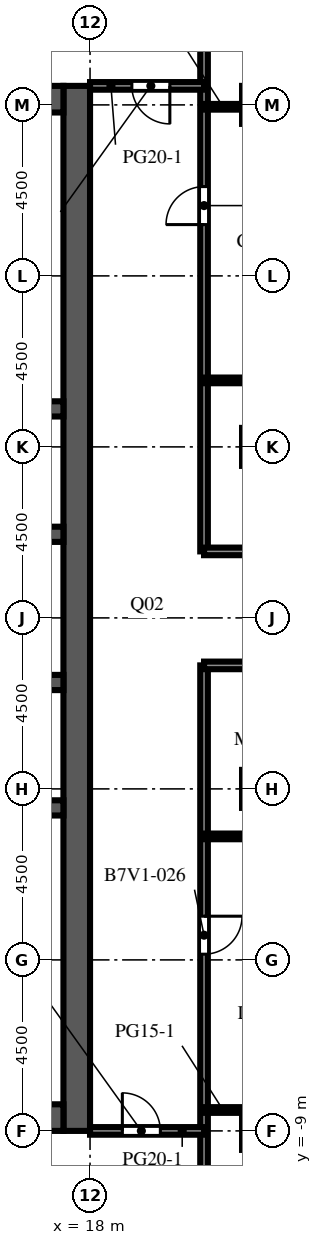
"""IFC4 building model, lengths in metres.
Left out: names, types, materials, properties, quantities, classifications, styles, units other than length and angle.
Written with IfcOpenShell. Run it as: python <this file> out.ifc"""

import sys

from ifc_helpers import new_model, si_unit, direction, frame, frame_2d, origin, place, context, subcontext, project, spatial, rectangle, extrude, element, fill, save


model = new_model("IFC4")
c1 = context("Model", 3, precision=1e-05, world=origin(), true_north=direction((0.0, 1.0)))
c2 = subcontext(c1, "Body", "Model", "MODEL_VIEW")
j1 = project(units=[si_unit("LENGTHUNIT", "METRE"), si_unit("PLANEANGLEUNIT", "RADIAN")], contexts=[c1])
p1 = place(None, origin())
s1 = spatial("IfcSite", under=j1, at=p1, CompositionType="ELEMENT")
p2 = place(p1, origin())
s2 = spatial("IfcBuilding", under=s1, at=p2, CompositionType="ELEMENT")
p3 = place(p2, frame((0.0, 0.0, 252.1)))
s3 = spatial("IfcBuildingStorey", under=s2, at=p3, CompositionType="ELEMENT", Elevation=252.1)
p4 = place(p3, frame((17.65, -9.0, 0.0), z_axis=(0.0, 0.0, 1.0), x_axis=(0.0, 1.0, 0.0)))
e1 = element("IfcWall", 1, at=p4, inside=s3, PredefinedType="SHEAR", context=c2, shape_type="SweptSolid", body=[
    extrude(rectangle(XDim=27.5, YDim=0.7, at=frame_2d((13.75, 0.0))), origin(), (0.0, 0.0, 1.0), 4.1),
])
p5 = place(p4, frame((12.55, 0.0, 0.0)))
e2 = element("IfcOpeningElement", 2, at=p5, cuts=e1, PredefinedType="OPENING", context=c2, shape_type="SweptSolid", body=[
    extrude(rectangle(XDim=2.4, YDim=2.4, at=frame_2d((1.2, 1.2))), frame((0.0, 0.36, 0.0), z_axis=(0.0, -1.0, 0.0), x_axis=(1.0, 0.0, 0.0)), (0.0, 0.0, 1.0), 0.72),
])
p6 = place(p4, frame((6.825, 0.0, 0.0)))
e3 = element("IfcOpeningElement", 3, at=p6, cuts=e1, PredefinedType="OPENING", context=c2, shape_type="SweptSolid", body=[
    extrude(rectangle(XDim=1.2, YDim=2.1, at=frame_2d((0.6, 1.05))), frame((0.0, 0.36, 0.0), z_axis=(0.0, -1.0, 0.0), x_axis=(1.0, 0.0, 0.0)), (0.0, 0.0, 1.0), 0.72),
])
p7 = place(p4, frame((19.475, 0.0, 0.0)))
e4 = element("IfcOpeningElement", 4, at=p7, cuts=e1, PredefinedType="OPENING", context=c2, shape_type="SweptSolid", body=[
    extrude(rectangle(XDim=1.2, YDim=2.1, at=frame_2d((0.6, 1.05))), frame((0.0, 0.36, 0.0), z_axis=(0.0, -1.0, 0.0), x_axis=(1.0, 0.0, 0.0)), (0.0, 0.0, 1.0), 0.72),
])
for number, where, z_axis, x_axis in (
    (5, (6.7, -8.65, 0.0), (0.0, 0.0, 1.0), (1.0, 0.0, 0.0)),
    (6, (6.7, 18.15, 0.0), (0.0, 0.0, 1.0), (1.0, 0.0, 0.0)),
):
    element("IfcWall", number, at=place(p3, frame(where, z_axis=z_axis, x_axis=x_axis)), inside=s3, PredefinedType="SHEAR", context=c2, shape_type="SweptSolid", body=[
        extrude(rectangle(XDim=10.6, YDim=0.7, at=frame_2d((5.3, 0.0))), origin(), (0.0, 0.0, 1.0), 4.1),
    ])
p8 = place(p3, frame((6.7, -0.5, 0.0), z_axis=(0.0, 0.0, 1.0), x_axis=(1.0, 0.0, 0.0)))
e7 = element("IfcWall", 7, at=p8, inside=s3, PredefinedType="SHEAR", context=c2, shape_type="SweptSolid", body=[
    extrude(rectangle(XDim=10.6, YDim=0.4, at=frame_2d((5.3, 0.0))), origin(), (0.0, 0.0, 1.0), 4.1),
])
p9 = place(p3, frame((6.7, 2.8, 0.0), z_axis=(0.0, 0.0, 1.0), x_axis=(1.0, 0.0, 0.0)))
e8 = element("IfcWall", 8, at=p9, inside=s3, PredefinedType="SHEAR", context=c2, shape_type="SweptSolid", body=[
    extrude(rectangle(XDim=10.6, YDim=0.4, at=frame_2d((5.3, 0.0))), origin(), (0.0, 0.0, 1.0), 4.1),
])
p10 = place(p9, frame((0.688, 0.0, 0.0)))
e9 = element("IfcOpeningElement", 9, at=p10, cuts=e8, PredefinedType="OPENING", context=c2, shape_type="SweptSolid", body=[
    extrude(rectangle(XDim=1.1, YDim=2.1, at=frame_2d((0.55, 1.05))), frame((0.0, 0.21, 0.0), z_axis=(0.0, -1.0, 0.0), x_axis=(1.0, 0.0, 0.0)), (0.0, 0.0, 1.0), 0.42),
])
p11 = place(p9, frame((3.438, 0.0, 0.0)))
e10 = element("IfcOpeningElement", 10, at=p11, cuts=e8, PredefinedType="OPENING", context=c2, shape_type="SweptSolid", body=[
    extrude(rectangle(XDim=1.1, YDim=2.1, at=frame_2d((0.55, 1.05))), frame((0.0, 0.21, 0.0), z_axis=(0.0, -1.0, 0.0), x_axis=(1.0, 0.0, 0.0)), (0.0, 0.0, 1.0), 0.42),
])
p12 = place(p9, frame((6.113, 0.0, 0.0)))
e11 = element("IfcOpeningElement", 11, at=p12, cuts=e8, PredefinedType="OPENING", context=c2, shape_type="SweptSolid", body=[
    extrude(rectangle(XDim=1.0, YDim=2.1, at=frame_2d((0.5, 1.05))), frame((0.0, 0.21, 0.0), z_axis=(0.0, -1.0, 0.0), x_axis=(1.0, 0.0, 0.0)), (0.0, 0.0, 1.0), 0.42),
])
p13 = place(p9, frame((8.863, 0.0, 0.0)))
e12 = element("IfcOpeningElement", 12, at=p13, cuts=e8, PredefinedType="OPENING", context=c2, shape_type="SweptSolid", body=[
    extrude(rectangle(XDim=1.0, YDim=2.1, at=frame_2d((0.5, 1.05))), frame((0.0, 0.21, 0.0), z_axis=(0.0, -1.0, 0.0), x_axis=(1.0, 0.0, 0.0)), (0.0, 0.0, 1.0), 0.42),
])
p14 = place(p3, frame((6.7, 6.7, 0.0), z_axis=(0.0, 0.0, 1.0), x_axis=(1.0, 0.0, 0.0)))
e13 = element("IfcWall", 13, at=p14, inside=s3, PredefinedType="SHEAR", context=c2, shape_type="SweptSolid", body=[
    extrude(rectangle(XDim=10.6, YDim=0.4, at=frame_2d((5.3, 0.0))), origin(), (0.0, 0.0, 1.0), 4.1),
])
p15 = place(p14, frame((3.438, 0.0, 0.0)))
e14 = element("IfcOpeningElement", 14, at=p15, cuts=e13, PredefinedType="OPENING", context=c2, shape_type="SweptSolid", body=[
    extrude(rectangle(XDim=1.1, YDim=2.1, at=frame_2d((0.55, 1.05))), frame((0.0, 0.21, 0.0), z_axis=(0.0, -1.0, 0.0), x_axis=(1.0, 0.0, 0.0)), (0.0, 0.0, 1.0), 0.42),
])
p16 = place(p14, frame((6.062, 0.0, 0.0)))
e15 = element("IfcOpeningElement", 15, at=p16, cuts=e13, PredefinedType="OPENING", context=c2, shape_type="SweptSolid", body=[
    extrude(rectangle(XDim=1.1, YDim=2.1, at=frame_2d((0.55, 1.05))), frame((0.0, 0.21, 0.0), z_axis=(0.0, -1.0, 0.0), x_axis=(1.0, 0.0, 0.0)), (0.0, 0.0, 1.0), 0.42),
])
p17 = place(p14, frame((8.812, 0.0, 0.0)))
e16 = element("IfcOpeningElement", 16, at=p17, cuts=e13, PredefinedType="OPENING", context=c2, shape_type="SweptSolid", body=[
    extrude(rectangle(XDim=1.1, YDim=2.1, at=frame_2d((0.55, 1.05))), frame((0.0, 0.21, 0.0), z_axis=(0.0, -1.0, 0.0), x_axis=(1.0, 0.0, 0.0)), (0.0, 0.0, 1.0), 0.42),
])
p18 = place(p14, frame((0.738, 0.0, 0.0)))
e17 = element("IfcOpeningElement", 17, at=p18, cuts=e13, PredefinedType="OPENING", context=c2, shape_type="SweptSolid", body=[
    extrude(rectangle(XDim=1.0, YDim=2.1, at=frame_2d((0.5, 1.05))), frame((0.0, 0.21, 0.0), z_axis=(0.0, -1.0, 0.0), x_axis=(1.0, 0.0, 0.0)), (0.0, 0.0, 1.0), 0.42),
])
p19 = place(p3, frame((6.7, 10.0, 0.0), z_axis=(0.0, 0.0, 1.0), x_axis=(1.0, 0.0, 0.0)))
e18 = element("IfcWall", 18, at=p19, inside=s3, PredefinedType="SHEAR", context=c2, shape_type="SweptSolid", body=[
    extrude(rectangle(XDim=10.6, YDim=0.4, at=frame_2d((5.3, 0.0))), origin(), (0.0, 0.0, 1.0), 4.1),
])
p20 = place(p3, frame((21.0, 3.25, 0.0), z_axis=(0.0, 0.0, 1.0), x_axis=(0.0, -1.0, 0.0)))
e19 = element("IfcWall", 19, at=p20, inside=s3, PredefinedType="PARTITIONING", context=c2, shape_type="SweptSolid", body=[
    extrude(rectangle(XDim=25.6, YDim=0.2, at=frame_2d((12.8, 0.0))), origin(), (0.0, 0.0, 1.0), 3.65),
])
p21 = place(p20, frame((6.6, 0.0, 0.0)))
e20 = element("IfcOpeningElement", 20, at=p21, cuts=e19, PredefinedType="OPENING", context=c2, shape_type="SweptSolid", body=[
    extrude(rectangle(XDim=1.0, YDim=2.1, at=frame_2d((0.5, 1.05))), frame((0.0, 0.11, 0.0), z_axis=(0.0, -1.0, 0.0), x_axis=(1.0, 0.0, 0.0)), (0.0, 0.0, 1.0), 0.22),
])
p22 = place(p3, frame((21.0, 31.35, 0.0), z_axis=(0.0, 0.0, 1.0), x_axis=(0.0, -1.0, 0.0)))
e21 = element("IfcWall", 21, at=p22, inside=s3, PredefinedType="PARTITIONING", context=c2, shape_type="SweptSolid", body=[
    extrude(rectangle(XDim=25.1, YDim=0.2, at=frame_2d((12.55, 0.0))), origin(), (0.0, 0.0, 1.0), 3.65),
])
p23 = place(p22, frame((15.5, 0.0, 0.0)))
e22 = element("IfcOpeningElement", 22, at=p23, cuts=e21, PredefinedType="OPENING", context=c2, shape_type="SweptSolid", body=[
    extrude(rectangle(XDim=1.0, YDim=2.1, at=frame_2d((0.5, 1.05))), frame((0.0, 0.11, 0.0), z_axis=(0.0, -1.0, 0.0), x_axis=(1.0, 0.0, 0.0)), (0.0, 0.0, 1.0), 0.22),
])
p24 = place(p3, frame((21.0, -9.0, 0.0), z_axis=(0.0, 0.0, 1.0), x_axis=(-1.0, 0.0, 0.0)))
e23 = element("IfcWall", 23, at=p24, inside=s3, PredefinedType="PARTITIONING", context=c2, shape_type="SweptSolid", body=[
    extrude(rectangle(XDim=3.0, YDim=0.2, at=frame_2d((1.5, 0.0))), origin(), (0.0, 0.0, 1.0), 3.65),
])
p25 = place(p24, frame((1.15, 0.0, 0.0)))
e24 = element("IfcOpeningElement", 24, at=p25, cuts=e23, PredefinedType="OPENING", context=c2, shape_type="SweptSolid", body=[
    extrude(rectangle(XDim=1.0, YDim=2.1, at=frame_2d((0.5, 1.05))), frame((0.0, 0.11, 0.0), z_axis=(0.0, -1.0, 0.0), x_axis=(1.0, 0.0, 0.0)), (0.0, 0.0, 1.0), 0.22),
])
p26 = place(p3, frame((21.0, -8.45, 0.0), z_axis=(0.0, 0.0, 1.0), x_axis=(1.0, 0.0, 0.0)))
e25 = element("IfcWall", 25, at=p26, inside=s3, PredefinedType="PARTITIONING", context=c2, shape_type="SweptSolid", body=[
    extrude(rectangle(XDim=1.0, YDim=0.15, at=frame_2d((0.5, 0.0))), origin(), (0.0, 0.0, 1.0), 3.65),
])
p27 = place(p3, frame((21.0, -1.25, 0.0), z_axis=(0.0, 0.0, 1.0), x_axis=(1.0, 0.0, 0.0)))
e26 = element("IfcWall", 26, at=p27, inside=s3, PredefinedType="PARTITIONING", context=c2, shape_type="SweptSolid", body=[
    extrude(rectangle(XDim=5.85, YDim=0.15, at=frame_2d((2.925, 0.0))), origin(), (0.0, 0.0, 1.0), 3.65),
])
p28 = place(p27, frame((3.1, 0.0, 0.0)))
e27 = element("IfcOpeningElement", 27, at=p28, cuts=e26, PredefinedType="OPENING", context=c2, shape_type="SweptSolid", body=[
    extrude(rectangle(XDim=1.0, YDim=2.1, at=frame_2d((0.5, 1.05))), frame((0.0, 0.085, 0.0), z_axis=(0.0, -1.0, 0.0), x_axis=(1.0, 0.0, 0.0)), (0.0, 0.0, 1.0), 0.17),
])
for number, where, z_axis, x_axis in (
    (28, (21.0, 3.25, 0.0), (0.0, 0.0, 1.0), (1.0, 0.0, 0.0)),
    (29, (21.0, 6.25, 0.0), (0.0, 0.0, 1.0), (1.0, 0.0, 0.0)),
):
    element("IfcWall", number, at=place(p3, frame(where, z_axis=z_axis, x_axis=x_axis)), inside=s3, PredefinedType="PARTITIONING", context=c2, shape_type="SweptSolid", body=[
        extrude(rectangle(XDim=5.85, YDim=0.2, at=frame_2d((2.925, 0.0))), origin(), (0.0, 0.0, 1.0), 3.65),
    ])
p29 = place(p3, frame((26.85, 10.75, 0.0), z_axis=(0.0, 0.0, 1.0), x_axis=(-1.0, 0.0, 0.0)))
e30 = element("IfcWall", 30, at=p29, inside=s3, PredefinedType="PARTITIONING", context=c2, shape_type="SweptSolid", body=[
    extrude(rectangle(XDim=5.85, YDim=0.15, at=frame_2d((2.925, 0.0))), origin(), (0.0, 0.0, 1.0), 3.65),
])
p30 = place(p29, frame((2.0, 0.0, 0.0)))
e31 = element("IfcOpeningElement", 31, at=p30, cuts=e30, PredefinedType="OPENING", context=c2, shape_type="SweptSolid", body=[
    extrude(rectangle(XDim=1.0, YDim=2.1, at=frame_2d((0.5, 1.05))), frame((0.0, 0.085, 0.0), z_axis=(0.0, -1.0, 0.0), x_axis=(1.0, 0.0, 0.0)), (0.0, 0.0, 1.0), 0.17),
])
p31 = place(p3, frame((21.0, 17.95, 0.0), z_axis=(0.0, 0.0, 1.0), x_axis=(1.0, 0.0, 0.0)))
e32 = element("IfcWall", 32, at=p31, inside=s3, PredefinedType="PARTITIONING", context=c2, shape_type="SweptSolid", body=[
    extrude(rectangle(XDim=1.0, YDim=0.15, at=frame_2d((0.5, 0.0))), origin(), (0.0, 0.0, 1.0), 3.65),
])
p32 = place(p3, frame((18.0, 18.5, 0.0), z_axis=(0.0, 0.0, 1.0), x_axis=(1.0, 0.0, 0.0)))
e33 = element("IfcWall", 33, at=p32, inside=s3, PredefinedType="PARTITIONING", context=c2, shape_type="SweptSolid", body=[
    extrude(rectangle(XDim=3.0, YDim=0.2, at=frame_2d((1.5, 0.0))), origin(), (0.0, 0.0, 1.0), 3.65),
])
p33 = place(p32, frame((1.1, 0.0, 0.0)))
e34 = element("IfcOpeningElement", 34, at=p33, cuts=e33, PredefinedType="OPENING", context=c2, shape_type="SweptSolid", body=[
    extrude(rectangle(XDim=1.0, YDim=2.1, at=frame_2d((0.5, 1.05))), frame((0.0, 0.11, 0.0), z_axis=(0.0, -1.0, 0.0), x_axis=(1.0, 0.0, 0.0)), (0.0, 0.0, 1.0), 0.22),
])
p34 = place(p5, origin())
e35 = element("IfcDoor", 35, at=p34, inside=s3, OperationType="DOUBLE_DOOR_DOUBLE_SWING", PredefinedType="DOOR", context=c2, shape_type="SweptSolid", body=[
    extrude(rectangle(XDim=2.4, YDim=2.4, at=frame_2d((1.2, 1.2))), frame((0.0, 0.025, 0.0), z_axis=(0.0, -1.0, 0.0), x_axis=(1.0, 0.0, 0.0)), (0.0, 0.0, 1.0), 0.05),
])
fill(e2, e35)
p35 = place(p6, frame((1.2, 0.0, 0.0), z_axis=(0.0, 0.0, 1.0), x_axis=(-1.0, 0.0, 0.0)))
e36 = element("IfcDoor", 36, at=p35, inside=s3, OperationType="SINGLE_SWING_LEFT", PredefinedType="DOOR", context=c2, shape_type="SweptSolid", body=[
    extrude(rectangle(XDim=1.2, YDim=2.1, at=frame_2d((0.6, 1.05))), frame((0.0, 0.025, 0.0), z_axis=(0.0, -1.0, 0.0), x_axis=(1.0, 0.0, 0.0)), (0.0, 0.0, 1.0), 0.05),
])
fill(e3, e36)
p36 = place(p7, frame((1.2, 0.0, 0.0), z_axis=(0.0, 0.0, 1.0), x_axis=(-1.0, 0.0, 0.0)))
e37 = element("IfcDoor", 37, at=p36, inside=s3, OperationType="SINGLE_SWING_LEFT", PredefinedType="DOOR", context=c2, shape_type="SweptSolid", body=[
    extrude(rectangle(XDim=1.2, YDim=2.1, at=frame_2d((0.6, 1.05))), frame((0.0, 0.025, 0.0), z_axis=(0.0, -1.0, 0.0), x_axis=(1.0, 0.0, 0.0)), (0.0, 0.0, 1.0), 0.05),
])
fill(e4, e37)
p37 = place(p25, origin())
e38 = element("IfcDoor", 38, at=p37, inside=s3, OperationType="SINGLE_SWING_RIGHT", PredefinedType="DOOR", context=c2, shape_type="SweptSolid", body=[
    extrude(rectangle(XDim=1.0, YDim=2.1, at=frame_2d((0.5, 1.05))), frame((0.0, 0.025, 0.0), z_axis=(0.0, -1.0, 0.0), x_axis=(1.0, 0.0, 0.0)), (0.0, 0.0, 1.0), 0.05),
])
fill(e24, e38)
p38 = place(p33, origin())
e39 = element("IfcDoor", 39, at=p38, inside=s3, OperationType="SINGLE_SWING_RIGHT", PredefinedType="DOOR", context=c2, shape_type="SweptSolid", body=[
    extrude(rectangle(XDim=1.0, YDim=2.1, at=frame_2d((0.5, 1.05))), frame((0.0, 0.025, 0.0), z_axis=(0.0, -1.0, 0.0), x_axis=(1.0, 0.0, 0.0)), (0.0, 0.0, 1.0), 0.05),
])
fill(e34, e39)
p39 = place(p21, origin())
e40 = element("IfcDoor", 40, at=p39, inside=s3, OperationType="SINGLE_SWING_LEFT", PredefinedType="DOOR", context=c2, shape_type="SweptSolid", body=[
    extrude(rectangle(XDim=1.0, YDim=2.1, at=frame_2d((0.5, 1.05))), frame((0.0, 0.025, 0.0), z_axis=(0.0, -1.0, 0.0), x_axis=(1.0, 0.0, 0.0)), (0.0, 0.0, 1.0), 0.05),
])
fill(e20, e40)
p40 = place(p23, origin())
e41 = element("IfcDoor", 41, at=p40, inside=s3, OperationType="SINGLE_SWING_RIGHT", PredefinedType="DOOR", context=c2, shape_type="SweptSolid", body=[
    extrude(rectangle(XDim=1.0, YDim=2.1, at=frame_2d((0.5, 1.05))), frame((0.0, 0.025, 0.0), z_axis=(0.0, -1.0, 0.0), x_axis=(1.0, 0.0, 0.0)), (0.0, 0.0, 1.0), 0.05),
])
fill(e22, e41)
save(model, sys.argv[1])
